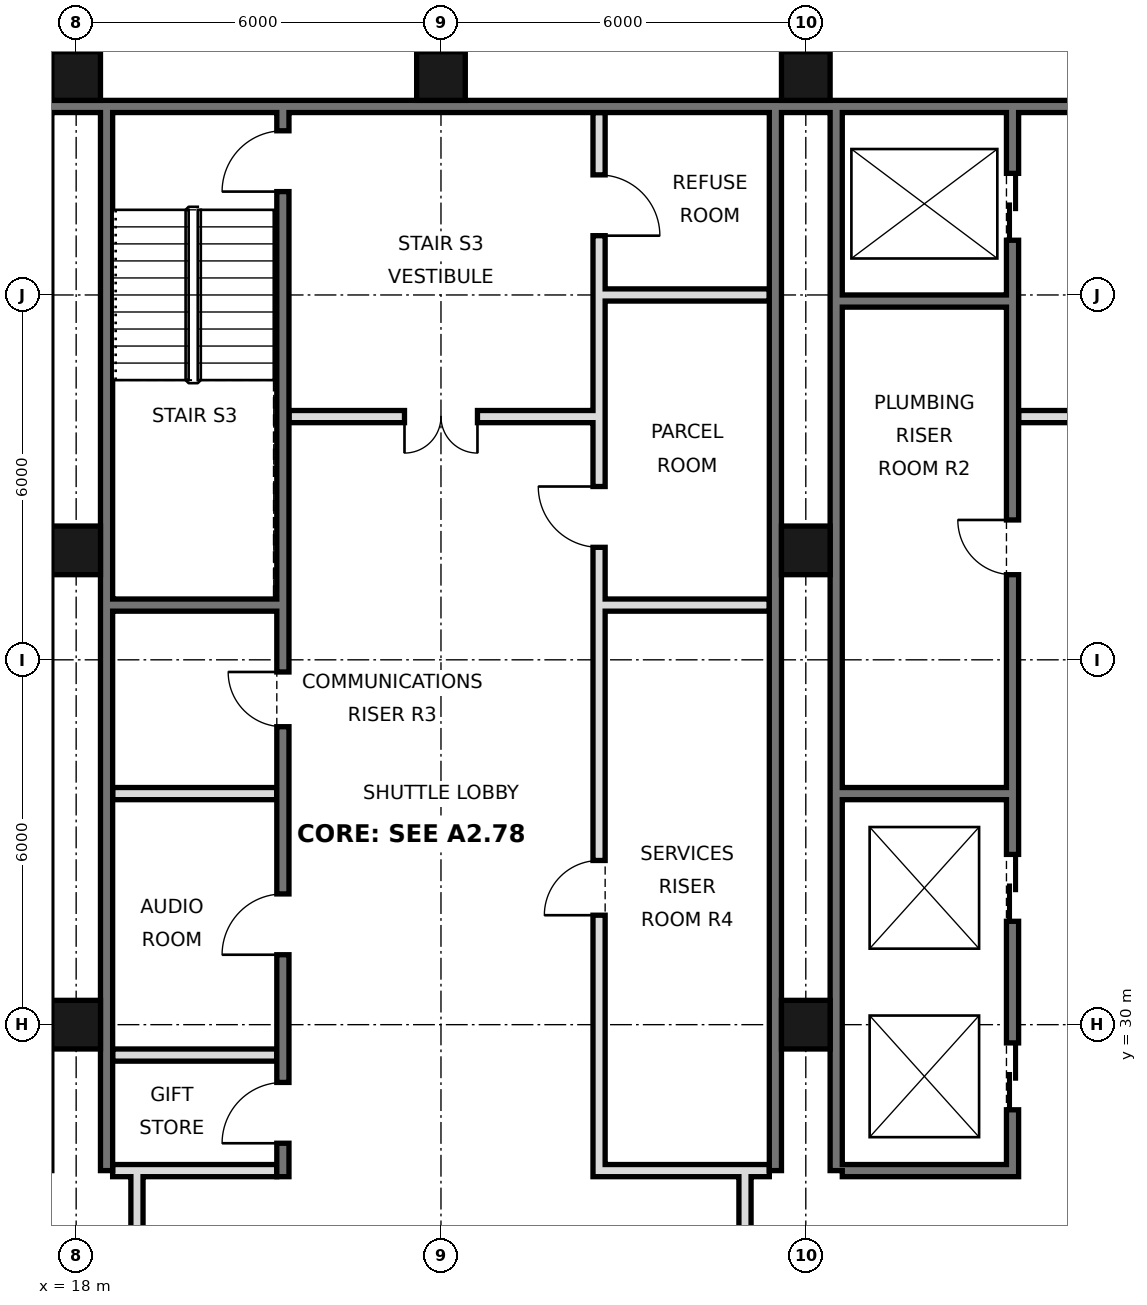
"""IFC4 building model, lengths in metres.
Left out: names, types, materials, properties, quantities, classifications, styles, units other than length and angle.
Written with IfcOpenShell. Run it as: python <this file> out.ifc"""

import sys

from ifc_helpers import new_model, si_unit, direction, frame, frame_2d, origin, origin_2d, place, context, subcontext, project, spatial, rectangle, hollow_rectangle, extrude, element, fill, save


model = new_model("IFC4")
c1 = context("Model", 3, precision=1e-05, world=origin(), true_north=direction((0.0, 1.0)))
c2 = subcontext(c1, "Body", "Model", "MODEL_VIEW")
j1 = project(units=[si_unit("LENGTHUNIT", "METRE"), si_unit("PLANEANGLEUNIT", "RADIAN")], contexts=[c1])
p1 = place(None, origin())
s1 = spatial("IfcSite", under=j1, at=p1, CompositionType="ELEMENT")
p2 = place(p1, origin())
s2 = spatial("IfcBuilding", under=s1, at=p2, CompositionType="ELEMENT")
p3 = place(p2, frame((0.0, 0.0, 312.4)))
s3 = spatial("IfcBuildingStorey", under=s2, at=p3, CompositionType="ELEMENT", Elevation=312.4)
for number, where, z_axis, x_axis in (
    (1, (18.0, 30.0, 0.0), (0.0, 0.0, 1.0), (1.0, 0.0, 0.0)),
    (2, (18.0, 37.8, 0.0), (0.0, 0.0, 1.0), (1.0, 0.0, 0.0)),
    (3, (18.0, 45.6, 0.0), (0.0, 0.0, 1.0), (1.0, 0.0, 0.0)),
    (4, (24.0, 45.6, 0.0), (0.0, 0.0, 1.0), (1.0, 0.0, 0.0)),
    (5, (30.0, 30.0, 0.0), (0.0, 0.0, 1.0), (1.0, 0.0, 0.0)),
    (6, (30.0, 37.8, 0.0), (0.0, 0.0, 1.0), (1.0, 0.0, 0.0)),
    (7, (30.0, 45.6, 0.0), (0.0, 0.0, 1.0), (1.0, 0.0, 0.0)),
):
    element("IfcColumn", number, at=place(p3, frame(where, z_axis=z_axis, x_axis=x_axis)), inside=s3, PredefinedType="COLUMN", context=c2, shape_type="SweptSolid", body=[
        extrude(hollow_rectangle(XDim=0.8, YDim=0.8, WallThickness=0.025, at=origin_2d()), origin(), (0.0, 0.0, 1.0), 3.6),
    ])
p4 = place(p3, frame((6.6, 45.1, 0.0), z_axis=(0.0, 0.0, 1.0), x_axis=(1.0, 0.0, 0.0)))
e8 = element("IfcWall", 8, at=p4, inside=s3, PredefinedType="SOLIDWALL", context=c2, shape_type="SweptSolid", body=[
    extrude(rectangle(XDim=34.8, YDim=0.2, at=frame_2d((17.4, 0.0))), origin(), (0.0, 0.0, 1.0), 3.42),
])
for number, where, z_axis, x_axis in (
    (9, (18.5, 27.6, 0.0), (0.0, 0.0, 1.0), (0.0, 1.0, 0.0)),
    (10, (29.5, 27.6, 0.0), (0.0, 0.0, 1.0), (0.0, 1.0, 0.0)),
    (11, (30.5, 27.6, 0.0), (0.0, 0.0, 1.0), (0.0, 1.0, 0.0)),
):
    element("IfcWall", number, at=place(p3, frame(where, z_axis=z_axis, x_axis=x_axis)), inside=s3, PredefinedType="SOLIDWALL", context=c2, shape_type="SweptSolid", body=[
        extrude(rectangle(XDim=17.5, YDim=0.2, at=frame_2d((8.75, 0.0))), origin(), (0.0, 0.0, 1.0), 3.42),
    ])
p5 = place(p3, frame((19.0, 21.6, 0.0), z_axis=(0.0, 0.0, 1.0), x_axis=(0.0, 1.0, 0.0)))
e12 = element("IfcWall", 12, at=p5, inside=s3, PredefinedType="PARTITIONING", context=c2, shape_type="SweptSolid", body=[
    extrude(rectangle(XDim=6.0, YDim=0.2, at=frame_2d((3.0, 0.0))), origin(), (0.0, 0.0, 1.0), 3.42),
])
p6 = place(p5, frame((2.1, 0.0, 0.0)))
e13 = element("IfcOpeningElement", 13, at=p6, cuts=e12, PredefinedType="OPENING", context=c2, shape_type="SweptSolid", body=[
    extrude(rectangle(XDim=1.8, YDim=2.1, at=frame_2d((0.9, 1.05))), frame((0.0, 0.11, 0.0), z_axis=(0.0, -1.0, 0.0), x_axis=(1.0, 0.0, 0.0)), (0.0, 0.0, 1.0), 0.22),
])
p7 = place(p3, frame((29.0, 21.6, 0.0), z_axis=(0.0, 0.0, 1.0), x_axis=(0.0, 1.0, 0.0)))
e14 = element("IfcWall", 14, at=p7, inside=s3, PredefinedType="PARTITIONING", context=c2, shape_type="SweptSolid", body=[
    extrude(rectangle(XDim=6.0, YDim=0.2, at=frame_2d((3.0, 0.0))), origin(), (0.0, 0.0, 1.0), 3.42),
])
p8 = place(p7, frame((2.1, 0.0, 0.0)))
e15 = element("IfcOpeningElement", 15, at=p8, cuts=e14, PredefinedType="OPENING", context=c2, shape_type="SweptSolid", body=[
    extrude(rectangle(XDim=1.8, YDim=2.1, at=frame_2d((0.9, 1.05))), frame((0.0, 0.11, 0.0), z_axis=(0.0, -1.0, 0.0), x_axis=(1.0, 0.0, 0.0)), (0.0, 0.0, 1.0), 0.22),
])
p9 = place(p3, frame((21.4, 27.5, 0.0), z_axis=(0.0, 0.0, 1.0), x_axis=(0.0, 1.0, 0.0)))
e16 = element("IfcWall", 16, at=p9, inside=s3, PredefinedType="SOLIDWALL", context=c2, shape_type="SweptSolid", body=[
    extrude(rectangle(XDim=17.5, YDim=0.2, at=frame_2d((8.75, 0.0))), origin(), (0.0, 0.0, 1.0), 3.42),
])
p10 = place(p9, frame((0.55, 0.0, 0.0)))
e17 = element("IfcOpeningElement", 17, at=p10, cuts=e16, PredefinedType="OPENING", context=c2, shape_type="SweptSolid", body=[
    extrude(rectangle(XDim=1.0, YDim=2.1, at=frame_2d((0.5, 1.05))), frame((0.0, 0.11, 0.0), z_axis=(0.0, -1.0, 0.0), x_axis=(1.0, 0.0, 0.0)), (0.0, 0.0, 1.0), 0.22),
])
p11 = place(p9, frame((3.65, 0.0, 0.0)))
e18 = element("IfcOpeningElement", 18, at=p11, cuts=e16, PredefinedType="OPENING", context=c2, shape_type="SweptSolid", body=[
    extrude(rectangle(XDim=1.0, YDim=2.1, at=frame_2d((0.5, 1.05))), frame((0.0, 0.11, 0.0), z_axis=(0.0, -1.0, 0.0), x_axis=(1.0, 0.0, 0.0)), (0.0, 0.0, 1.0), 0.22),
])
p12 = place(p9, frame((16.2, 0.0, 0.0)))
e19 = element("IfcOpeningElement", 19, at=p12, cuts=e16, PredefinedType="OPENING", context=c2, shape_type="SweptSolid", body=[
    extrude(rectangle(XDim=1.0, YDim=2.1, at=frame_2d((0.5, 1.05))), frame((0.0, 0.11, 0.0), z_axis=(0.0, -1.0, 0.0), x_axis=(1.0, 0.0, 0.0)), (0.0, 0.0, 1.0), 0.22),
])
p13 = place(p9, frame((7.4, 0.0, 0.0)))
e20 = element("IfcOpeningElement", 20, at=p13, cuts=e16, PredefinedType="OPENING", context=c2, shape_type="SweptSolid", body=[
    extrude(rectangle(XDim=0.9, YDim=2.1, at=frame_2d((0.45, 1.05))), frame((0.0, 0.11, 0.0), z_axis=(0.0, -1.0, 0.0), x_axis=(1.0, 0.0, 0.0)), (0.0, 0.0, 1.0), 0.22),
])
p14 = place(p3, frame((26.6, 27.5, 0.0), z_axis=(0.0, 0.0, 1.0), x_axis=(0.0, 1.0, 0.0)))
e21 = element("IfcWall", 21, at=p14, inside=s3, PredefinedType="SOLIDWALL", context=c2, shape_type="SweptSolid", body=[
    extrude(rectangle(XDim=17.5, YDim=0.2, at=frame_2d((8.75, 0.0))), origin(), (0.0, 0.0, 1.0), 3.42),
])
p15 = place(p14, frame((4.3, 0.0, 0.0)))
e22 = element("IfcOpeningElement", 22, at=p15, cuts=e21, PredefinedType="OPENING", context=c2, shape_type="SweptSolid", body=[
    extrude(rectangle(XDim=0.9, YDim=2.1, at=frame_2d((0.45, 1.05))), frame((0.0, 0.11, 0.0), z_axis=(0.0, -1.0, 0.0), x_axis=(1.0, 0.0, 0.0)), (0.0, 0.0, 1.0), 0.22),
])
p16 = place(p14, frame((10.35, 0.0, 0.0)))
e23 = element("IfcOpeningElement", 23, at=p16, cuts=e21, PredefinedType="OPENING", context=c2, shape_type="SweptSolid", body=[
    extrude(rectangle(XDim=1.0, YDim=2.1, at=frame_2d((0.5, 1.05))), frame((0.0, 0.11, 0.0), z_axis=(0.0, -1.0, 0.0), x_axis=(1.0, 0.0, 0.0)), (0.0, 0.0, 1.0), 0.22),
])
p17 = place(p14, frame((15.475, 0.0, 0.0)))
e24 = element("IfcOpeningElement", 24, at=p17, cuts=e21, PredefinedType="OPENING", context=c2, shape_type="SweptSolid", body=[
    extrude(rectangle(XDim=1.0, YDim=2.1, at=frame_2d((0.5, 1.05))), frame((0.0, 0.11, 0.0), z_axis=(0.0, -1.0, 0.0), x_axis=(1.0, 0.0, 0.0)), (0.0, 0.0, 1.0), 0.22),
])
p18 = place(p3, frame((33.4, 27.5, 0.0), z_axis=(0.0, 0.0, 1.0), x_axis=(0.0, 1.0, 0.0)))
e25 = element("IfcWall", 25, at=p18, inside=s3, PredefinedType="SOLIDWALL", context=c2, shape_type="SweptSolid", body=[
    extrude(rectangle(XDim=17.5, YDim=0.2, at=frame_2d((8.75, 0.0))), origin(), (0.0, 0.0, 1.0), 3.42),
])
p19 = place(p18, frame((1.1, 0.0, 0.0)))
e26 = element("IfcOpeningElement", 26, at=p19, cuts=e25, PredefinedType="OPENING", context=c2, shape_type="SweptSolid", body=[
    extrude(rectangle(XDim=1.1, YDim=2.1, at=frame_2d((0.55, 1.05))), frame((0.0, 0.11, 0.0), z_axis=(0.0, -1.0, 0.0), x_axis=(1.0, 0.0, 0.0)), (0.0, 0.0, 1.0), 0.22),
])
p20 = place(p18, frame((4.2, 0.0, 0.0)))
e27 = element("IfcOpeningElement", 27, at=p20, cuts=e25, PredefinedType="OPENING", context=c2, shape_type="SweptSolid", body=[
    extrude(rectangle(XDim=1.1, YDim=2.1, at=frame_2d((0.55, 1.05))), frame((0.0, 0.11, 0.0), z_axis=(0.0, -1.0, 0.0), x_axis=(1.0, 0.0, 0.0)), (0.0, 0.0, 1.0), 0.22),
])
p21 = place(p18, frame((15.4, 0.0, 0.0)))
e28 = element("IfcOpeningElement", 28, at=p21, cuts=e25, PredefinedType="OPENING", context=c2, shape_type="SweptSolid", body=[
    extrude(rectangle(XDim=1.1, YDim=2.1, at=frame_2d((0.55, 1.05))), frame((0.0, 0.11, 0.0), z_axis=(0.0, -1.0, 0.0), x_axis=(1.0, 0.0, 0.0)), (0.0, 0.0, 1.0), 0.22),
])
p22 = place(p18, frame((9.9, 0.0, 0.0)))
e29 = element("IfcOpeningElement", 29, at=p22, cuts=e25, PredefinedType="OPENING", context=c2, shape_type="SweptSolid", body=[
    extrude(rectangle(XDim=0.9, YDim=2.1, at=frame_2d((0.45, 1.05))), frame((0.0, 0.11, 0.0), z_axis=(0.0, -1.0, 0.0), x_axis=(1.0, 0.0, 0.0)), (0.0, 0.0, 1.0), 0.22),
])
p23 = place(p3, frame((18.6, 27.6, 0.0), z_axis=(0.0, 0.0, 1.0), x_axis=(1.0, 0.0, 0.0)))
e30 = element("IfcWall", 30, at=p23, inside=s3, PredefinedType="PARTITIONING", context=c2, shape_type="SweptSolid", body=[
    extrude(rectangle(XDim=2.7, YDim=0.2, at=frame_2d((1.35, 0.0))), origin(), (0.0, 0.0, 1.0), 3.42),
])
for number, where, z_axis, x_axis in (
    (31, (26.7, 27.6, 0.0), (0.0, 0.0, 1.0), (1.0, 0.0, 0.0)),
    (32, (30.6, 27.6, 0.0), (0.0, 0.0, 1.0), (1.0, 0.0, 0.0)),
):
    element("IfcWall", number, at=place(p3, frame(where, z_axis=z_axis, x_axis=x_axis)), inside=s3, PredefinedType="SOLIDWALL", context=c2, shape_type="SweptSolid", body=[
        extrude(rectangle(XDim=2.7, YDim=0.2, at=frame_2d((1.35, 0.0))), origin(), (0.0, 0.0, 1.0), 3.42),
    ])
p24 = place(p3, frame((18.6, 29.5, 0.0), z_axis=(0.0, 0.0, 1.0), x_axis=(1.0, 0.0, 0.0)))
e33 = element("IfcWall", 33, at=p24, inside=s3, PredefinedType="PARTITIONING", context=c2, shape_type="SweptSolid", body=[
    extrude(rectangle(XDim=2.7, YDim=0.2, at=frame_2d((1.35, 0.0))), origin(), (0.0, 0.0, 1.0), 3.42),
])
for number, where, z_axis, x_axis in (
    (34, (18.6, 33.8, 0.0), (0.0, 0.0, 1.0), (1.0, 0.0, 0.0)),
    (35, (30.6, 33.8, 0.0), (0.0, 0.0, 1.0), (1.0, 0.0, 0.0)),
    (36, (18.6, 36.9, 0.0), (0.0, 0.0, 1.0), (1.0, 0.0, 0.0)),
    (37, (26.7, 36.9, 0.0), (0.0, 0.0, 1.0), (1.0, 0.0, 0.0)),
):
    element("IfcWall", number, at=place(p3, frame(where, z_axis=z_axis, x_axis=x_axis)), inside=s3, PredefinedType="SOLIDWALL", context=c2, shape_type="SweptSolid", body=[
        extrude(rectangle(XDim=2.7, YDim=0.2, at=frame_2d((1.35, 0.0))), origin(), (0.0, 0.0, 1.0), 3.42),
    ])
p25 = place(p3, frame((21.5, 40.0, 0.0), z_axis=(0.0, 0.0, 1.0), x_axis=(1.0, 0.0, 0.0)))
e38 = element("IfcWall", 38, at=p25, inside=s3, PredefinedType="PARTITIONING", context=c2, shape_type="SweptSolid", body=[
    extrude(rectangle(XDim=5.0, YDim=0.2, at=frame_2d((2.5, 0.0))), origin(), (0.0, 0.0, 1.0), 3.42),
])
p26 = place(p25, frame((1.9, 0.0, 0.0)))
e39 = element("IfcOpeningElement", 39, at=p26, cuts=e38, PredefinedType="OPENING", context=c2, shape_type="SweptSolid", body=[
    extrude(rectangle(XDim=1.2, YDim=2.1, at=frame_2d((0.6, 1.05))), frame((0.0, 0.11, 0.0), z_axis=(0.0, -1.0, 0.0), x_axis=(1.0, 0.0, 0.0)), (0.0, 0.0, 1.0), 0.22),
])
p27 = place(p3, frame((33.5, 40.0, 0.0), z_axis=(0.0, 0.0, 1.0), x_axis=(1.0, 0.0, 0.0)))
e40 = element("IfcWall", 40, at=p27, inside=s3, PredefinedType="PARTITIONING", context=c2, shape_type="SweptSolid", body=[
    extrude(rectangle(XDim=5.0, YDim=0.2, at=frame_2d((2.5, 0.0))), origin(), (0.0, 0.0, 1.0), 3.42),
])
p28 = place(p27, frame((1.9, 0.0, 0.0)))
e41 = element("IfcOpeningElement", 41, at=p28, cuts=e40, PredefinedType="OPENING", context=c2, shape_type="SweptSolid", body=[
    extrude(rectangle(XDim=1.2, YDim=2.1, at=frame_2d((0.6, 1.05))), frame((0.0, 0.11, 0.0), z_axis=(0.0, -1.0, 0.0), x_axis=(1.0, 0.0, 0.0)), (0.0, 0.0, 1.0), 0.22),
])
p29 = place(p3, frame((30.6, 41.9, 0.0), z_axis=(0.0, 0.0, 1.0), x_axis=(1.0, 0.0, 0.0)))
e42 = element("IfcWall", 42, at=p29, inside=s3, PredefinedType="SOLIDWALL", context=c2, shape_type="SweptSolid", body=[
    extrude(rectangle(XDim=2.7, YDim=0.2, at=frame_2d((1.35, 0.0))), origin(), (0.0, 0.0, 1.0), 3.42),
])
p30 = place(p3, frame((26.7, 42.0, 0.0), z_axis=(0.0, 0.0, 1.0), x_axis=(1.0, 0.0, 0.0)))
e43 = element("IfcWall", 43, at=p30, inside=s3, PredefinedType="PARTITIONING", context=c2, shape_type="SweptSolid", body=[
    extrude(rectangle(XDim=2.7, YDim=0.2, at=frame_2d((1.35, 0.0))), origin(), (0.0, 0.0, 1.0), 3.42),
])
p31 = place(p26, frame((1.2, 0.0, 0.0), z_axis=(0.0, 0.0, 1.0), x_axis=(-1.0, 0.0, 0.0)))
e44 = element("IfcDoor", 44, at=p31, inside=s3, OperationType="DOUBLE_DOOR_SINGLE_SWING", PredefinedType="DOOR", context=c2, shape_type="SweptSolid", body=[
    extrude(rectangle(XDim=1.2, YDim=2.1, at=frame_2d((0.6, 1.05))), frame((0.0, 0.025, 0.0), z_axis=(0.0, -1.0, 0.0), x_axis=(1.0, 0.0, 0.0)), (0.0, 0.0, 1.0), 0.05),
])
fill(e39, e44)
p32 = place(p19, origin())
e45 = element("IfcDoor", 45, at=p32, inside=s3, OperationType="DOUBLE_DOOR_SLIDING", PredefinedType="DOOR", context=c2, shape_type="SweptSolid", body=[
    extrude(rectangle(XDim=1.1, YDim=2.1, at=frame_2d((0.55, 1.05))), frame((0.0, 0.025, 0.0), z_axis=(0.0, -1.0, 0.0), x_axis=(1.0, 0.0, 0.0)), (0.0, 0.0, 1.0), 0.05),
])
fill(e26, e45)
p33 = place(p20, origin())
e46 = element("IfcDoor", 46, at=p33, inside=s3, OperationType="DOUBLE_DOOR_SLIDING", PredefinedType="DOOR", context=c2, shape_type="SweptSolid", body=[
    extrude(rectangle(XDim=1.1, YDim=2.1, at=frame_2d((0.55, 1.05))), frame((0.0, 0.025, 0.0), z_axis=(0.0, -1.0, 0.0), x_axis=(1.0, 0.0, 0.0)), (0.0, 0.0, 1.0), 0.05),
])
fill(e27, e46)
p34 = place(p21, origin())
e47 = element("IfcDoor", 47, at=p34, inside=s3, OperationType="DOUBLE_DOOR_SLIDING", PredefinedType="DOOR", context=c2, shape_type="SweptSolid", body=[
    extrude(rectangle(XDim=1.1, YDim=2.1, at=frame_2d((0.55, 1.05))), frame((0.0, 0.025, 0.0), z_axis=(0.0, -1.0, 0.0), x_axis=(1.0, 0.0, 0.0)), (0.0, 0.0, 1.0), 0.05),
])
fill(e28, e47)
p35 = place(p10, origin())
e48 = element("IfcDoor", 48, at=p35, inside=s3, OperationType="SINGLE_SWING_LEFT", PredefinedType="DOOR", context=c2, shape_type="SweptSolid", body=[
    extrude(rectangle(XDim=1.0, YDim=2.1, at=frame_2d((0.5, 1.05))), frame((0.0, 0.025, 0.0), z_axis=(0.0, -1.0, 0.0), x_axis=(1.0, 0.0, 0.0)), (0.0, 0.0, 1.0), 0.05),
])
fill(e17, e48)
p36 = place(p11, origin())
e49 = element("IfcDoor", 49, at=p36, inside=s3, OperationType="SINGLE_SWING_LEFT", PredefinedType="DOOR", context=c2, shape_type="SweptSolid", body=[
    extrude(rectangle(XDim=1.0, YDim=2.1, at=frame_2d((0.5, 1.05))), frame((0.0, 0.025, 0.0), z_axis=(0.0, -1.0, 0.0), x_axis=(1.0, 0.0, 0.0)), (0.0, 0.0, 1.0), 0.05),
])
fill(e18, e49)
p37 = place(p12, origin())
e50 = element("IfcDoor", 50, at=p37, inside=s3, OperationType="SINGLE_SWING_LEFT", PredefinedType="DOOR", context=c2, shape_type="SweptSolid", body=[
    extrude(rectangle(XDim=1.0, YDim=2.1, at=frame_2d((0.5, 1.05))), frame((0.0, 0.025, 0.0), z_axis=(0.0, -1.0, 0.0), x_axis=(1.0, 0.0, 0.0)), (0.0, 0.0, 1.0), 0.05),
])
fill(e19, e50)
p38 = place(p22, frame((0.9, 0.0, 0.0), z_axis=(0.0, 0.0, 1.0), x_axis=(-1.0, 0.0, 0.0)))
e51 = element("IfcDoor", 51, at=p38, inside=s3, OperationType="SINGLE_SWING_LEFT", PredefinedType="DOOR", context=c2, shape_type="SweptSolid", body=[
    extrude(rectangle(XDim=0.9, YDim=2.1, at=frame_2d((0.45, 1.05))), frame((0.0, 0.025, 0.0), z_axis=(0.0, -1.0, 0.0), x_axis=(1.0, 0.0, 0.0)), (0.0, 0.0, 1.0), 0.05),
])
fill(e29, e51)
p39 = place(p13, frame((0.9, 0.0, 0.0), z_axis=(0.0, 0.0, 1.0), x_axis=(-1.0, 0.0, 0.0)))
e52 = element("IfcDoor", 52, at=p39, inside=s3, OperationType="SINGLE_SWING_LEFT", PredefinedType="DOOR", context=c2, shape_type="SweptSolid", body=[
    extrude(rectangle(XDim=0.9, YDim=2.1, at=frame_2d((0.45, 1.05))), frame((0.0, 0.025, 0.0), z_axis=(0.0, -1.0, 0.0), x_axis=(1.0, 0.0, 0.0)), (0.0, 0.0, 1.0), 0.05),
])
fill(e20, e52)
p40 = place(p15, origin())
e53 = element("IfcDoor", 53, at=p40, inside=s3, OperationType="SINGLE_SWING_LEFT", PredefinedType="DOOR", context=c2, shape_type="SweptSolid", body=[
    extrude(rectangle(XDim=0.9, YDim=2.1, at=frame_2d((0.45, 1.05))), frame((0.0, 0.025, 0.0), z_axis=(0.0, -1.0, 0.0), x_axis=(1.0, 0.0, 0.0)), (0.0, 0.0, 1.0), 0.05),
])
fill(e22, e53)
p41 = place(p16, frame((1.0, 0.0, 0.0), z_axis=(0.0, 0.0, 1.0), x_axis=(-1.0, 0.0, 0.0)))
e54 = element("IfcDoor", 54, at=p41, inside=s3, OperationType="SINGLE_SWING_LEFT", PredefinedType="DOOR", context=c2, shape_type="SweptSolid", body=[
    extrude(rectangle(XDim=1.0, YDim=2.1, at=frame_2d((0.5, 1.05))), frame((0.0, 0.025, 0.0), z_axis=(0.0, -1.0, 0.0), x_axis=(1.0, 0.0, 0.0)), (0.0, 0.0, 1.0), 0.05),
])
fill(e23, e54)
p42 = place(p17, frame((1.0, 0.0, 0.0), z_axis=(0.0, 0.0, 1.0), x_axis=(-1.0, 0.0, 0.0)))
e55 = element("IfcDoor", 55, at=p42, inside=s3, OperationType="SINGLE_SWING_RIGHT", PredefinedType="DOOR", context=c2, shape_type="SweptSolid", body=[
    extrude(rectangle(XDim=1.0, YDim=2.1, at=frame_2d((0.5, 1.05))), frame((0.0, 0.025, 0.0), z_axis=(0.0, -1.0, 0.0), x_axis=(1.0, 0.0, 0.0)), (0.0, 0.0, 1.0), 0.05),
])
fill(e24, e55)
save(model, sys.argv[1])
